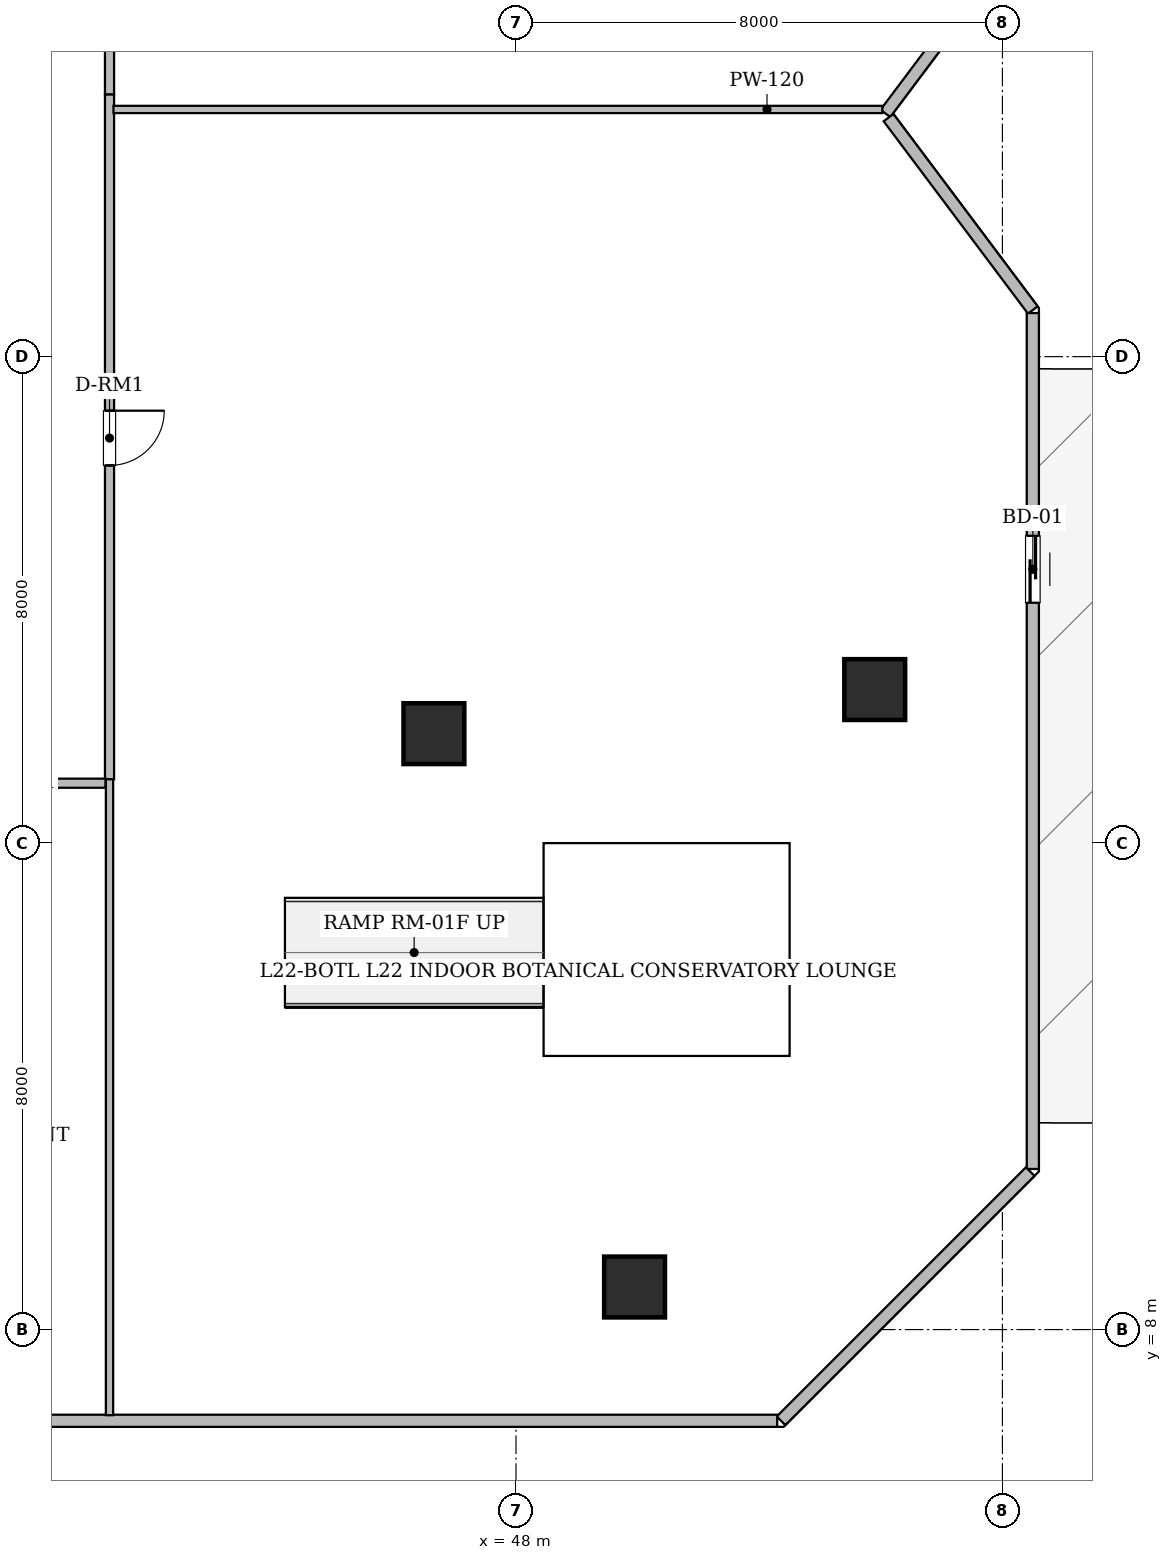
"""IFC4 building model, lengths in metres.
Left out: names, types, materials, properties, quantities, classifications, styles, units other than length and angle.
Written with IfcOpenShell. Run it as: python <this file> out.ifc"""

import sys

from ifc_helpers import new_model, si_unit, direction, frame, frame_2d, origin, origin_2d, place, context, subcontext, project, spatial, rectangle, hollow_rectangle, extrude, element, fill, save


model = new_model("IFC4")
c1 = context("Model", 3, precision=1e-05, world=origin(), true_north=direction((0.0, 1.0)))
c2 = subcontext(c1, "Body", "Model", "MODEL_VIEW")
j1 = project(units=[si_unit("LENGTHUNIT", "METRE"), si_unit("PLANEANGLEUNIT", "RADIAN")], contexts=[c1])
p1 = place(None, origin())
s1 = spatial("IfcSite", under=j1, at=p1, CompositionType="ELEMENT")
p2 = place(p1, origin())
s2 = spatial("IfcBuilding", under=s1, at=p2, CompositionType="ELEMENT")
p3 = place(p2, frame((0.0, 0.0, 89.8)))
s3 = spatial("IfcBuildingStorey", under=s2, at=p3, CompositionType="ELEMENT", Elevation=89.8)
for number, where, z_axis, x_axis in (
    (1, (49.95, 8.7, 0.025), (0.0, 0.0, 1.0), (1.0, 0.0, 0.0)),
    (2, (53.9, 18.525, 0.025), (0.0, 0.0, 1.0), (1.0, 0.0, 0.0)),
    (3, (46.65, 17.8, 0.025), (0.0, 0.0, 1.0), (1.0, 0.0, 0.0)),
):
    element("IfcColumn", number, at=place(p3, frame(where, z_axis=z_axis, x_axis=x_axis)), inside=s3, PredefinedType="COLUMN", context=c2, shape_type="SweptSolid", body=[
        extrude(hollow_rectangle(XDim=1.0, YDim=1.0, WallThickness=0.05, at=origin_2d()), origin(), (0.0, 0.0, 1.0), 4.775),
    ])
p4 = place(p3, frame((56.469, 31.191, 0.0), z_axis=(0.0, 0.0, 1.0), x_axis=(-0.600137081448, -0.799897170561, 0.0)))
e4 = element("IfcWall", 4, at=p4, inside=s3, PredefinedType="STANDARD", context=c2, shape_type="SweptSolid", body=[
    extrude(rectangle(XDim=3.989, YDim=0.2, at=frame_2d((1.995, 0.0))), origin(), (0.0, 0.0, 1.0), 4.58),
])
p5 = place(p3, frame((54.127, 27.931, 0.0), z_axis=(0.0, 0.0, 1.0), x_axis=(0.600029630681, -0.799977776132, 0.0)))
e5 = element("IfcWall", 5, at=p5, inside=s3, PredefinedType="STANDARD", context=c2, shape_type="SweptSolid", body=[
    extrude(rectangle(XDim=3.955, YDim=0.2, at=frame_2d((1.978, 0.0))), origin(), (0.0, 0.0, 1.0), 4.58),
])
p6 = place(p3, frame((56.5, 24.717, 0.0), z_axis=(0.0, 0.0, 1.0), x_axis=(0.0, -1.0, 0.0)))
e6 = element("IfcWall", 6, at=p6, inside=s3, PredefinedType="STANDARD", context=c2, shape_type="SweptSolid", body=[
    extrude(rectangle(XDim=14.076, YDim=0.2, at=frame_2d((7.038, 0.0))), origin(), (0.0, 0.0, 1.0), 4.58),
])
p7 = place(p6, frame((3.664, 0.0, 0.0)))
e7 = element("IfcOpeningElement", 7, at=p7, cuts=e6, PredefinedType="OPENING", context=c2, shape_type="SweptSolid", body=[
    extrude(rectangle(XDim=1.1, YDim=2.2, at=frame_2d((0.55, 1.1))), frame((0.0, 0.11, 0.0), z_axis=(0.0, -1.0, 0.0), x_axis=(1.0, 0.0, 0.0)), (0.0, 0.0, 1.0), 0.22),
])
p8 = place(p3, frame((56.457, 10.598, 0.0), z_axis=(0.0, 0.0, 1.0), x_axis=(-0.707127843897, -0.707085717849, 0.0)))
e8 = element("IfcWall", 8, at=p8, inside=s3, PredefinedType="STANDARD", context=c2, shape_type="SweptSolid", body=[
    extrude(rectangle(XDim=5.795, YDim=0.2, at=frame_2d((2.898, 0.0))), origin(), (0.0, 0.0, 1.0), 4.58),
])
p9 = place(p3, frame((52.296, 6.5, 0.0), z_axis=(0.0, 0.0, 1.0), x_axis=(-1.0, 0.0, 0.0)))
e9 = element("IfcWall", 9, at=p9, inside=s3, PredefinedType="STANDARD", context=c2, shape_type="SweptSolid", body=[
    extrude(rectangle(XDim=38.593, YDim=0.2, at=frame_2d((19.296, 0.0))), origin(), (0.0, 0.0, 1.0), 4.58),
])
p10 = place(p9, frame((12.883, 0.0, 0.9)))
e10 = element("IfcOpeningElement", 10, at=p10, cuts=e9, PredefinedType="OPENING", context=c2, shape_type="SweptSolid", body=[
    extrude(rectangle(XDim=1.8, YDim=1.6, at=frame_2d((0.9, 0.8))), frame((0.0, 0.11, 0.0), z_axis=(0.0, -1.0, 0.0), x_axis=(1.0, 0.0, 0.0)), (0.0, 0.0, 1.0), 0.22),
])
p11 = place(p3, frame((41.315, 28.314, 0.0), z_axis=(0.0, 0.0, 1.0), x_axis=(0.0, -1.0, 0.0)))
e11 = element("IfcWall", 11, at=p11, inside=s3, PredefinedType="STANDARD", context=c2, shape_type="SweptSolid", body=[
    extrude(rectangle(XDim=11.264, YDim=0.15, at=frame_2d((5.632, 0.0))), origin(), (0.0, 0.0, 1.0), 3.797),
])
p12 = place(p11, frame((5.203, 0.0, 0.0)))
e12 = element("IfcOpeningElement", 12, at=p12, cuts=e11, PredefinedType="OPENING", context=c2, shape_type="SweptSolid", body=[
    extrude(rectangle(XDim=0.9, YDim=2.1, at=frame_2d((0.45, 1.05))), frame((0.0, 0.085, 0.0), z_axis=(0.0, -1.0, 0.0), x_axis=(1.0, 0.0, 0.0)), (0.0, 0.0, 1.0), 0.17),
])
p13 = place(p3, frame((41.315, 38.95, 0.0), z_axis=(0.0, 0.0, 1.0), x_axis=(0.0, -1.0, 0.0)))
e13 = element("IfcWall", 13, at=p13, inside=s3, PredefinedType="STANDARD", context=c2, shape_type="SweptSolid", body=[
    extrude(rectangle(XDim=10.636, YDim=0.15, at=frame_2d((5.318, 0.0))), origin(), (0.0, 0.0, 1.0), 3.797),
])
p14 = place(p13, frame((4.743, 0.0, 0.0)))
e14 = element("IfcOpeningElement", 14, at=p14, cuts=e13, PredefinedType="OPENING", context=c2, shape_type="SweptSolid", body=[
    extrude(rectangle(XDim=1.15, YDim=2.2, at=frame_2d((0.575, 1.1))), frame((0.0, 0.085, 0.0), z_axis=(0.0, -1.0, 0.0), x_axis=(1.0, 0.0, 0.0)), (0.0, 0.0, 1.0), 0.17),
])
p15 = place(p3, frame((41.25, 16.985, 0.0), z_axis=(0.0, 0.0, 1.0), x_axis=(-1.0, 0.0, 0.0)))
e15 = element("IfcWall", 15, at=p15, inside=s3, PredefinedType="STANDARD", context=c2, shape_type="SweptSolid", body=[
    extrude(rectangle(XDim=4.736, YDim=0.15, at=frame_2d((2.368, 0.0))), origin(), (0.0, 0.0, 1.0), 3.797),
])
p16 = place(p15, frame((1.918, 0.0, 0.0)))
e16 = element("IfcOpeningElement", 16, at=p16, cuts=e15, PredefinedType="OPENING", context=c2, shape_type="SweptSolid", body=[
    extrude(rectangle(XDim=0.9, YDim=2.1, at=frame_2d((0.45, 1.05))), frame((0.0, 0.085, 0.0), z_axis=(0.0, -1.0, 0.0), x_axis=(1.0, 0.0, 0.0)), (0.0, 0.0, 1.0), 0.17),
])
p17 = place(p3, frame((41.38, 28.065, 0.0), z_axis=(0.0, 0.0, 1.0), x_axis=(1.0, 0.0, 0.0)))
e17 = element("IfcWall", 17, at=p17, inside=s3, PredefinedType="PARTITIONING", context=c2, shape_type="SweptSolid", body=[
    extrude(rectangle(XDim=12.645, YDim=0.12, at=frame_2d((6.323, 0.0))), origin(), (0.0, 0.0, 1.0), 3.797),
])
p18 = place(p3, frame((41.315, 6.592, 0.0), z_axis=(0.0, 0.0, 1.0), x_axis=(0.0, 1.0, 0.0)))
e18 = element("IfcWall", 18, at=p18, inside=s3, PredefinedType="PARTITIONING", context=c2, shape_type="SweptSolid", body=[
    extrude(rectangle(XDim=10.458, YDim=0.12, at=frame_2d((5.229, 0.0))), origin(), (0.0, 0.0, 1.0), 4.026),
])
p19 = place(p7, origin())
e19 = element("IfcDoor", 19, at=p19, inside=s3, OperationType="SLIDING_TO_LEFT", PredefinedType="DOOR", context=c2, shape_type="SweptSolid", body=[
    extrude(rectangle(XDim=1.1, YDim=2.2, at=frame_2d((0.55, 1.1))), frame((0.0, 0.025, 0.0), z_axis=(0.0, -1.0, 0.0), x_axis=(1.0, 0.0, 0.0)), (0.0, 0.0, 1.0), 0.05),
])
fill(e7, e19)
p20 = place(p12, origin())
e20 = element("IfcDoor", 20, at=p20, inside=s3, OperationType="SINGLE_SWING_LEFT", PredefinedType="DOOR", context=c2, shape_type="SweptSolid", body=[
    extrude(rectangle(XDim=0.9, YDim=2.1, at=frame_2d((0.45, 1.05))), frame((0.0, 0.025, 0.0), z_axis=(0.0, -1.0, 0.0), x_axis=(1.0, 0.0, 0.0)), (0.0, 0.0, 1.0), 0.05),
])
fill(e12, e20)
save(model, sys.argv[1])
